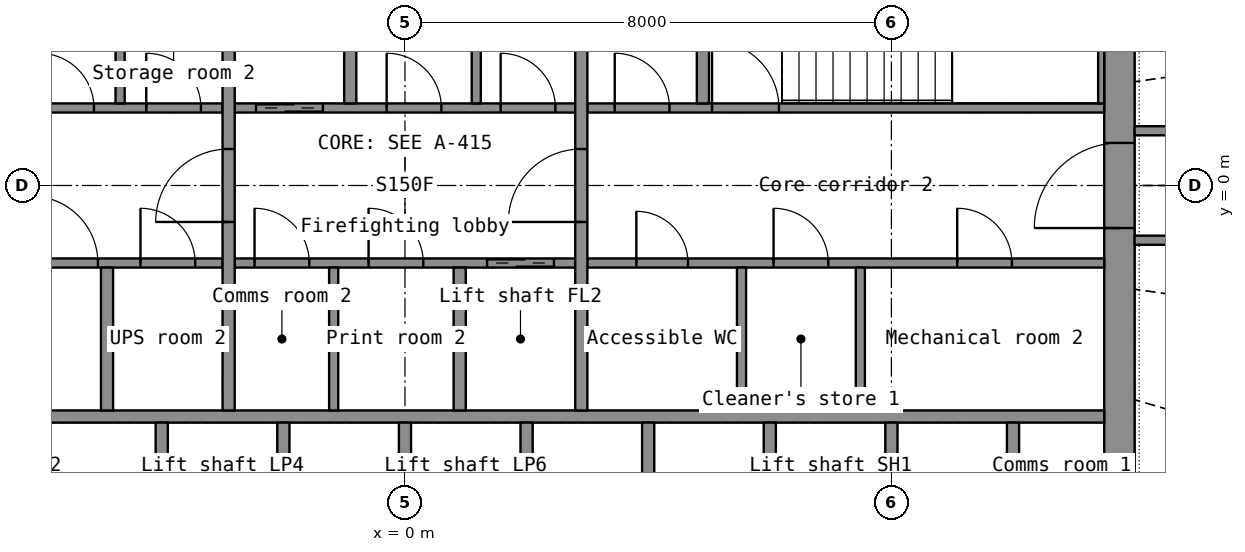
"""IFC4 building model, lengths in metres.
Left out: names, types, materials, properties, quantities, classifications, styles, units other than length and angle.
Written with IfcOpenShell. Run it as: python <this file> out.ifc"""

import sys

from ifc_helpers import new_model, si_unit, direction, frame, frame_2d, origin, place, context, subcontext, project, spatial, rectangle, extrude, element, fill, save


model = new_model("IFC4")
c1 = context("Model", 3, precision=1e-05, world=origin(), true_north=direction((0.0, 1.0)))
c2 = subcontext(c1, "Body", "Model", "MODEL_VIEW")
j1 = project(units=[si_unit("LENGTHUNIT", "METRE"), si_unit("PLANEANGLEUNIT", "RADIAN")], contexts=[c1])
p1 = place(None, origin())
s1 = spatial("IfcSite", under=j1, at=p1, CompositionType="ELEMENT")
p2 = place(p1, origin())
s2 = spatial("IfcBuilding", under=s1, at=p2, CompositionType="ELEMENT")
p3 = place(p2, frame((0.0, 0.0, 100.8)))
s3 = spatial("IfcBuildingStorey", under=s2, at=p3, CompositionType="ELEMENT", Elevation=100.8)
p4 = place(p3, frame((11.75, -7.2, 0.0), z_axis=(0.0, 0.0, 1.0), x_axis=(0.0, 1.0, 0.0)))
e1 = element("IfcWall", 1, at=p4, inside=s3, PredefinedType="SHEAR", context=c2, shape_type="SweptSolid", body=[
    extrude(rectangle(XDim=14.4, YDim=0.5, at=frame_2d((7.2, 0.0))), origin(), (0.0, 0.0, 1.0), 3.3),
])
p5 = place(p4, frame((6.5, 0.0, 0.0)))
e2 = element("IfcOpeningElement", 2, at=p5, cuts=e1, PredefinedType="OPENING", context=c2, shape_type="SweptSolid", body=[
    extrude(rectangle(XDim=1.4, YDim=2.2, at=frame_2d((0.7, 1.1))), frame((0.0, 0.26, 0.0), z_axis=(0.0, -1.0, 0.0), x_axis=(1.0, 0.0, 0.0)), (0.0, 0.0, 1.0), 0.52),
])
p6 = place(p3, frame((-11.5, -3.8, 0.0), z_axis=(0.0, 0.0, 1.0), x_axis=(1.0, 0.0, 0.0)))
e3 = element("IfcWall", 3, at=p6, inside=s3, PredefinedType="SHEAR", context=c2, shape_type="SweptSolid", body=[
    extrude(rectangle(XDim=23.0, YDim=0.2, at=frame_2d((11.5, 0.0))), origin(), (0.0, 0.0, 1.0), 3.3),
])
for number, where, z_axis, x_axis in (
    (4, (-4.0, -6.7, 0.0), (0.0, 0.0, 1.0), (0.0, 1.0, 0.0)),
    (5, (-2.0, -6.7, 0.0), (0.0, 0.0, 1.0), (0.0, 1.0, 0.0)),
    (6, (0.0, -6.7, 0.0), (0.0, 0.0, 1.0), (0.0, 1.0, 0.0)),
    (7, (2.0, -6.7, 0.0), (0.0, 0.0, 1.0), (0.0, 1.0, 0.0)),
    (8, (4.0, -6.7, 0.0), (0.0, 0.0, 1.0), (0.0, 1.0, 0.0)),
    (9, (6.0, -6.7, 0.0), (0.0, 0.0, 1.0), (0.0, 1.0, 0.0)),
    (10, (8.0, -6.7, 0.0), (0.0, 0.0, 1.0), (0.0, 1.0, 0.0)),
    (11, (10.0, -6.7, 0.0), (0.0, 0.0, 1.0), (0.0, 1.0, 0.0)),
):
    element("IfcWall", number, at=place(p3, frame(where, z_axis=z_axis, x_axis=x_axis)), inside=s3, PredefinedType="SHEAR", context=c2, shape_type="SweptSolid", body=[
        extrude(rectangle(XDim=2.8, YDim=0.2, at=frame_2d((1.4, 0.0))), origin(), (0.0, 0.0, 1.0), 3.3),
    ])
p7 = place(p3, frame((-11.5, -1.275, 0.0), z_axis=(0.0, 0.0, 1.0), x_axis=(1.0, 0.0, 0.0)))
e12 = element("IfcWall", 12, at=p7, inside=s3, PredefinedType="SHEAR", context=c2, shape_type="SweptSolid", body=[
    extrude(rectangle(XDim=8.5, YDim=0.15, at=frame_2d((4.25, 0.0))), origin(), (0.0, 0.0, 1.0), 3.3),
])
p8 = place(p7, frame((5.35, 0.0, 0.0)))
e13 = element("IfcOpeningElement", 13, at=p8, cuts=e12, PredefinedType="OPENING", context=c2, shape_type="SweptSolid", body=[
    extrude(rectangle(XDim=1.1, YDim=2.15, at=frame_2d((0.55, 1.075))), frame((0.0, 0.085, 0.0), z_axis=(0.0, -1.0, 0.0), x_axis=(1.0, 0.0, 0.0)), (0.0, 0.0, 1.0), 0.17),
])
p9 = place(p7, frame((7.15, 0.0, 0.0)))
e14 = element("IfcOpeningElement", 14, at=p9, cuts=e12, PredefinedType="OPENING", context=c2, shape_type="SweptSolid", body=[
    extrude(rectangle(XDim=0.9, YDim=2.1, at=frame_2d((0.45, 1.05))), frame((0.0, 0.085, 0.0), z_axis=(0.0, -1.0, 0.0), x_axis=(1.0, 0.0, 0.0)), (0.0, 0.0, 1.0), 0.17),
])
p10 = place(p3, frame((-2.8, -1.275, 0.0), z_axis=(0.0, 0.0, 1.0), x_axis=(1.0, 0.0, 0.0)))
e15 = element("IfcWall", 15, at=p10, inside=s3, PredefinedType="SHEAR", context=c2, shape_type="SweptSolid", body=[
    extrude(rectangle(XDim=5.6, YDim=0.15, at=frame_2d((2.8, 0.0))), origin(), (0.0, 0.0, 1.0), 3.3),
])
p11 = place(p10, frame((4.15, 0.0, 0.0)))
e16 = element("IfcOpeningElement", 16, at=p11, cuts=e15, PredefinedType="OPENING", context=c2, shape_type="SweptSolid", body=[
    extrude(rectangle(XDim=1.1, YDim=2.2, at=frame_2d((0.55, 1.1))), frame((0.0, 0.085, 0.0), z_axis=(0.0, -1.0, 0.0), x_axis=(1.0, 0.0, 0.0)), (0.0, 0.0, 1.0), 0.17),
])
p12 = place(p10, frame((0.326, 0.0, 0.0)))
e17 = element("IfcOpeningElement", 17, at=p12, cuts=e15, PredefinedType="OPENING", context=c2, shape_type="SweptSolid", body=[
    extrude(rectangle(XDim=0.9, YDim=2.1, at=frame_2d((0.45, 1.05))), frame((0.0, 0.085, 0.0), z_axis=(0.0, -1.0, 0.0), x_axis=(1.0, 0.0, 0.0)), (0.0, 0.0, 1.0), 0.17),
])
p13 = place(p10, frame((2.201, 0.0, 0.0)))
e18 = element("IfcOpeningElement", 18, at=p13, cuts=e15, PredefinedType="OPENING", context=c2, shape_type="SweptSolid", body=[
    extrude(rectangle(XDim=0.9, YDim=2.1, at=frame_2d((0.45, 1.05))), frame((0.0, 0.085, 0.0), z_axis=(0.0, -1.0, 0.0), x_axis=(1.0, 0.0, 0.0)), (0.0, 0.0, 1.0), 0.17),
])
p14 = place(p3, frame((3.0, -1.275, 0.0), z_axis=(0.0, 0.0, 1.0), x_axis=(1.0, 0.0, 0.0)))
e19 = element("IfcWall", 19, at=p14, inside=s3, PredefinedType="PARTITIONING", context=c2, shape_type="SweptSolid", body=[
    extrude(rectangle(XDim=8.5, YDim=0.15, at=frame_2d((4.25, 0.0))), origin(), (0.0, 0.0, 1.0), 3.3),
])
p15 = place(p14, frame((0.805, 0.0, 0.0)))
e20 = element("IfcOpeningElement", 20, at=p15, cuts=e19, PredefinedType="OPENING", context=c2, shape_type="SweptSolid", body=[
    extrude(rectangle(XDim=0.85, YDim=2.1, at=frame_2d((0.425, 1.05))), frame((0.0, 0.085, 0.0), z_axis=(0.0, -1.0, 0.0), x_axis=(1.0, 0.0, 0.0)), (0.0, 0.0, 1.0), 0.17),
])
p16 = place(p14, frame((3.062, 0.0, 0.0)))
e21 = element("IfcOpeningElement", 21, at=p16, cuts=e19, PredefinedType="OPENING", context=c2, shape_type="SweptSolid", body=[
    extrude(rectangle(XDim=0.9, YDim=2.1, at=frame_2d((0.45, 1.05))), frame((0.0, 0.085, 0.0), z_axis=(0.0, -1.0, 0.0), x_axis=(1.0, 0.0, 0.0)), (0.0, 0.0, 1.0), 0.17),
])
p17 = place(p14, frame((6.082, 0.0, 0.0)))
e22 = element("IfcOpeningElement", 22, at=p17, cuts=e19, PredefinedType="OPENING", context=c2, shape_type="SweptSolid", body=[
    extrude(rectangle(XDim=0.9, YDim=2.1, at=frame_2d((0.45, 1.05))), frame((0.0, 0.085, 0.0), z_axis=(0.0, -1.0, 0.0), x_axis=(1.0, 0.0, 0.0)), (0.0, 0.0, 1.0), 0.17),
])
p18 = place(p3, frame((-11.5, 1.275, 0.0), z_axis=(0.0, 0.0, 1.0), x_axis=(1.0, 0.0, 0.0)))
e23 = element("IfcWall", 23, at=p18, inside=s3, PredefinedType="PARTITIONING", context=c2, shape_type="SweptSolid", body=[
    extrude(rectangle(XDim=8.5, YDim=0.15, at=frame_2d((4.25, 0.0))), origin(), (0.0, 0.0, 1.0), 3.3),
])
p19 = place(p18, frame((0.782, 0.0, 0.0)))
e24 = element("IfcOpeningElement", 24, at=p19, cuts=e23, PredefinedType="OPENING", context=c2, shape_type="SweptSolid", body=[
    extrude(rectangle(XDim=0.85, YDim=2.1, at=frame_2d((0.425, 1.05))), frame((0.0, 0.085, 0.0), z_axis=(0.0, -1.0, 0.0), x_axis=(1.0, 0.0, 0.0)), (0.0, 0.0, 1.0), 0.17),
])
p20 = place(p18, frame((3.347, 0.0, 0.0)))
e25 = element("IfcOpeningElement", 25, at=p20, cuts=e23, PredefinedType="OPENING", context=c2, shape_type="SweptSolid", body=[
    extrude(rectangle(XDim=0.85, YDim=2.1, at=frame_2d((0.425, 1.05))), frame((0.0, 0.085, 0.0), z_axis=(0.0, -1.0, 0.0), x_axis=(1.0, 0.0, 0.0)), (0.0, 0.0, 1.0), 0.17),
])
p21 = place(p18, frame((5.485, 0.0, 0.0)))
e26 = element("IfcOpeningElement", 26, at=p21, cuts=e23, PredefinedType="OPENING", context=c2, shape_type="SweptSolid", body=[
    extrude(rectangle(XDim=0.9, YDim=2.1, at=frame_2d((0.45, 1.05))), frame((0.0, 0.085, 0.0), z_axis=(0.0, -1.0, 0.0), x_axis=(1.0, 0.0, 0.0)), (0.0, 0.0, 1.0), 0.17),
])
p22 = place(p18, frame((7.245, 0.0, 0.0)))
e27 = element("IfcOpeningElement", 27, at=p22, cuts=e23, PredefinedType="OPENING", context=c2, shape_type="SweptSolid", body=[
    extrude(rectangle(XDim=0.9, YDim=2.1, at=frame_2d((0.45, 1.05))), frame((0.0, 0.085, 0.0), z_axis=(0.0, -1.0, 0.0), x_axis=(1.0, 0.0, 0.0)), (0.0, 0.0, 1.0), 0.17),
])
p23 = place(p3, frame((-2.8, 1.275, 0.0), z_axis=(0.0, 0.0, 1.0), x_axis=(1.0, 0.0, 0.0)))
e28 = element("IfcWall", 28, at=p23, inside=s3, PredefinedType="SHEAR", context=c2, shape_type="SweptSolid", body=[
    extrude(rectangle(XDim=5.6, YDim=0.15, at=frame_2d((2.8, 0.0))), origin(), (0.0, 0.0, 1.0), 3.3),
])
p24 = place(p23, frame((0.35, 0.0, 0.0)))
e29 = element("IfcOpeningElement", 29, at=p24, cuts=e28, PredefinedType="OPENING", context=c2, shape_type="SweptSolid", body=[
    extrude(rectangle(XDim=1.1, YDim=2.2, at=frame_2d((0.55, 1.1))), frame((0.0, 0.085, 0.0), z_axis=(0.0, -1.0, 0.0), x_axis=(1.0, 0.0, 0.0)), (0.0, 0.0, 1.0), 0.17),
])
p25 = place(p23, frame((2.499, 0.0, 0.0)))
e30 = element("IfcOpeningElement", 30, at=p25, cuts=e28, PredefinedType="OPENING", context=c2, shape_type="SweptSolid", body=[
    extrude(rectangle(XDim=0.9, YDim=2.1, at=frame_2d((0.45, 1.05))), frame((0.0, 0.085, 0.0), z_axis=(0.0, -1.0, 0.0), x_axis=(1.0, 0.0, 0.0)), (0.0, 0.0, 1.0), 0.17),
])
p26 = place(p23, frame((4.374, 0.0, 0.0)))
e31 = element("IfcOpeningElement", 31, at=p26, cuts=e28, PredefinedType="OPENING", context=c2, shape_type="SweptSolid", body=[
    extrude(rectangle(XDim=0.9, YDim=2.1, at=frame_2d((0.45, 1.05))), frame((0.0, 0.085, 0.0), z_axis=(0.0, -1.0, 0.0), x_axis=(1.0, 0.0, 0.0)), (0.0, 0.0, 1.0), 0.17),
])
p27 = place(p3, frame((3.0, 1.275, 0.0), z_axis=(0.0, 0.0, 1.0), x_axis=(1.0, 0.0, 0.0)))
e32 = element("IfcWall", 32, at=p27, inside=s3, PredefinedType="SHEAR", context=c2, shape_type="SweptSolid", body=[
    extrude(rectangle(XDim=8.5, YDim=0.15, at=frame_2d((4.25, 0.0))), origin(), (0.0, 0.0, 1.0), 3.3),
])
p28 = place(p27, frame((2.05, 0.0, 0.0)))
e33 = element("IfcOpeningElement", 33, at=p28, cuts=e32, PredefinedType="OPENING", context=c2, shape_type="SweptSolid", body=[
    extrude(rectangle(XDim=1.1, YDim=2.15, at=frame_2d((0.55, 1.075))), frame((0.0, 0.085, 0.0), z_axis=(0.0, -1.0, 0.0), x_axis=(1.0, 0.0, 0.0)), (0.0, 0.0, 1.0), 0.17),
])
p29 = place(p27, frame((0.45, 0.0, 0.0)))
e34 = element("IfcOpeningElement", 34, at=p29, cuts=e32, PredefinedType="OPENING", context=c2, shape_type="SweptSolid", body=[
    extrude(rectangle(XDim=0.9, YDim=2.1, at=frame_2d((0.45, 1.05))), frame((0.0, 0.085, 0.0), z_axis=(0.0, -1.0, 0.0), x_axis=(1.0, 0.0, 0.0)), (0.0, 0.0, 1.0), 0.17),
])
p30 = place(p3, frame((-2.9, -3.7, 0.0), z_axis=(0.0, 0.0, 1.0), x_axis=(0.0, 1.0, 0.0)))
e35 = element("IfcWall", 35, at=p30, inside=s3, PredefinedType="SHEAR", context=c2, shape_type="SweptSolid", body=[
    extrude(rectangle(XDim=7.4, YDim=0.2, at=frame_2d((3.7, 0.0))), origin(), (0.0, 0.0, 1.0), 3.3),
])
p31 = place(p30, frame((3.1, 0.0, 0.0)))
e36 = element("IfcOpeningElement", 36, at=p31, cuts=e35, PredefinedType="OPENING", context=c2, shape_type="SweptSolid", body=[
    extrude(rectangle(XDim=1.2, YDim=2.2, at=frame_2d((0.6, 1.1))), frame((0.0, 0.11, 0.0), z_axis=(0.0, -1.0, 0.0), x_axis=(1.0, 0.0, 0.0)), (0.0, 0.0, 1.0), 0.22),
])
p32 = place(p3, frame((2.9, -3.7, 0.0), z_axis=(0.0, 0.0, 1.0), x_axis=(0.0, 1.0, 0.0)))
e37 = element("IfcWall", 37, at=p32, inside=s3, PredefinedType="SHEAR", context=c2, shape_type="SweptSolid", body=[
    extrude(rectangle(XDim=7.4, YDim=0.2, at=frame_2d((3.7, 0.0))), origin(), (0.0, 0.0, 1.0), 3.3),
])
p33 = place(p32, frame((3.1, 0.0, 0.0)))
e38 = element("IfcOpeningElement", 38, at=p33, cuts=e37, PredefinedType="OPENING", context=c2, shape_type="SweptSolid", body=[
    extrude(rectangle(XDim=1.2, YDim=2.2, at=frame_2d((0.6, 1.1))), frame((0.0, 0.11, 0.0), z_axis=(0.0, -1.0, 0.0), x_axis=(1.0, 0.0, 0.0)), (0.0, 0.0, 1.0), 0.22),
])
for number, where, z_axis, x_axis in (
    (39, (-0.9, 1.35, 0.0), (0.0, 0.0, 1.0), (0.0, 1.0, 0.0)),
    (40, (0.9, -3.7, 0.0), (0.0, 0.0, 1.0), (0.0, 1.0, 0.0)),
):
    element("IfcWall", number, at=place(p3, frame(where, z_axis=z_axis, x_axis=x_axis)), inside=s3, PredefinedType="SHEAR", context=c2, shape_type="SweptSolid", body=[
        extrude(rectangle(XDim=2.35, YDim=0.2, at=frame_2d((1.175, 0.0))), origin(), (0.0, 0.0, 1.0), 3.3),
    ])
p34 = place(p3, frame((11.45, 1.35, 0.0), z_axis=(0.0, 0.0, 1.0), x_axis=(0.0, 1.0, 0.0)))
e41 = element("IfcWall", 41, at=p34, inside=s3, PredefinedType="SHEAR", context=c2, shape_type="SweptSolid", body=[
    extrude(rectangle(XDim=2.35, YDim=0.1, at=frame_2d((1.175, 0.0))), origin(), (0.0, 0.0, 1.0), 3.3),
])
for number, where, z_axis, x_axis in (
    (42, (-4.9, -3.7, 0.0), (0.0, 0.0, 1.0), (0.0, 1.0, 0.0)),
    (43, (4.9, 1.35, 0.0), (0.0, 0.0, 1.0), (0.0, 1.0, 0.0)),
):
    element("IfcWall", number, at=place(p3, frame(where, z_axis=z_axis, x_axis=x_axis)), inside=s3, PredefinedType="SHEAR", context=c2, shape_type="SweptSolid", body=[
        extrude(rectangle(XDim=2.35, YDim=0.2, at=frame_2d((1.175, 0.0))), origin(), (0.0, 0.0, 1.0), 3.3),
    ])
for number, where, z_axis, x_axis in (
    (44, (-4.685, 1.35, 0.0), (0.0, 0.0, 1.0), (0.0, 1.0, 0.0)),
    (45, (5.535, -3.7, 0.0), (0.0, 0.0, 1.0), (0.0, 1.0, 0.0)),
    (46, (7.489, -3.7, 0.0), (0.0, 0.0, 1.0), (0.0, 1.0, 0.0)),
    (47, (1.173, 1.35, 0.0), (0.0, 0.0, 1.0), (0.0, 1.0, 0.0)),
    (48, (-1.173, -3.7, 0.0), (0.0, 0.0, 1.0), (0.0, 1.0, 0.0)),
):
    element("IfcWall", number, at=place(p3, frame(where, z_axis=z_axis, x_axis=x_axis)), inside=s3, PredefinedType="PARTITIONING", context=c2, shape_type="SweptSolid", body=[
        extrude(rectangle(XDim=2.35, YDim=0.15, at=frame_2d((1.175, 0.0))), origin(), (0.0, 0.0, 1.0), 3.3),
    ])
p35 = place(p3, frame((16.0, 0.9, 0.0), z_axis=(0.0, 0.0, 1.0), x_axis=(-1.0, 0.0, 0.0)))
e49 = element("IfcWall", 49, at=p35, inside=s3, PredefinedType="PARTITIONING", context=c2, shape_type="SweptSolid", body=[
    extrude(rectangle(XDim=4.0, YDim=0.15, at=frame_2d((2.0, 0.0))), origin(), (0.0, 0.0, 1.0), 2.4),
])
p36 = place(p35, frame((1.5, 0.0, 0.0)))
e50 = element("IfcOpeningElement", 50, at=p36, cuts=e49, PredefinedType="OPENING", context=c2, shape_type="SweptSolid", body=[
    extrude(rectangle(XDim=1.0, YDim=2.2, at=frame_2d((0.5, 1.1))), frame((0.0, 0.085, 0.0), z_axis=(0.0, -1.0, 0.0), x_axis=(1.0, 0.0, 0.0)), (0.0, 0.0, 1.0), 0.17),
])
p37 = place(p3, frame((12.0, -0.9, 0.0), z_axis=(0.0, 0.0, 1.0), x_axis=(1.0, 0.0, 0.0)))
e51 = element("IfcWall", 51, at=p37, inside=s3, PredefinedType="PARTITIONING", context=c2, shape_type="SweptSolid", body=[
    extrude(rectangle(XDim=0.559, YDim=0.15, at=frame_2d((0.279, 0.0))), origin(), (0.0, 0.0, 1.0), 2.4),
])
p38 = place(p5, origin())
e52 = element("IfcDoor", 52, at=p38, inside=s3, OperationType="DOUBLE_DOOR_SINGLE_SWING", PredefinedType="DOOR", context=c2, shape_type="SweptSolid", body=[
    extrude(rectangle(XDim=1.4, YDim=2.2, at=frame_2d((0.7, 1.1))), frame((0.0, 0.025, 0.0), z_axis=(0.0, -1.0, 0.0), x_axis=(1.0, 0.0, 0.0)), (0.0, 0.0, 1.0), 0.05),
])
fill(e2, e52)
p39 = place(p31, origin())
e53 = element("IfcDoor", 53, at=p39, inside=s3, OperationType="SINGLE_SWING_LEFT", PredefinedType="DOOR", context=c2, shape_type="SweptSolid", body=[
    extrude(rectangle(XDim=1.2, YDim=2.2, at=frame_2d((0.6, 1.1))), frame((0.0, 0.025, 0.0), z_axis=(0.0, -1.0, 0.0), x_axis=(1.0, 0.0, 0.0)), (0.0, 0.0, 1.0), 0.05),
])
fill(e36, e53)
p40 = place(p33, origin())
e54 = element("IfcDoor", 54, at=p40, inside=s3, OperationType="SINGLE_SWING_LEFT", PredefinedType="DOOR", context=c2, shape_type="SweptSolid", body=[
    extrude(rectangle(XDim=1.2, YDim=2.2, at=frame_2d((0.6, 1.1))), frame((0.0, 0.025, 0.0), z_axis=(0.0, -1.0, 0.0), x_axis=(1.0, 0.0, 0.0)), (0.0, 0.0, 1.0), 0.05),
])
fill(e38, e54)
p41 = place(p24, origin())
e55 = element("IfcDoor", 55, at=p41, inside=s3, OperationType="DOUBLE_DOOR_SLIDING", PredefinedType="DOOR", context=c2, shape_type="SweptSolid", body=[
    extrude(rectangle(XDim=1.1, YDim=2.2, at=frame_2d((0.55, 1.1))), frame((0.0, 0.025, 0.0), z_axis=(0.0, -1.0, 0.0), x_axis=(1.0, 0.0, 0.0)), (0.0, 0.0, 1.0), 0.05),
])
fill(e29, e55)
p42 = place(p11, origin())
e56 = element("IfcDoor", 56, at=p42, inside=s3, OperationType="DOUBLE_DOOR_SLIDING", PredefinedType="DOOR", context=c2, shape_type="SweptSolid", body=[
    extrude(rectangle(XDim=1.1, YDim=2.2, at=frame_2d((0.55, 1.1))), frame((0.0, 0.025, 0.0), z_axis=(0.0, -1.0, 0.0), x_axis=(1.0, 0.0, 0.0)), (0.0, 0.0, 1.0), 0.05),
])
fill(e16, e56)
p43 = place(p8, origin())
e57 = element("IfcDoor", 57, at=p43, inside=s3, OperationType="SINGLE_SWING_LEFT", PredefinedType="DOOR", context=c2, shape_type="SweptSolid", body=[
    extrude(rectangle(XDim=1.1, YDim=2.15, at=frame_2d((0.55, 1.075))), frame((0.0, 0.025, 0.0), z_axis=(0.0, -1.0, 0.0), x_axis=(1.0, 0.0, 0.0)), (0.0, 0.0, 1.0), 0.05),
])
fill(e13, e57)
p44 = place(p28, origin())
e58 = element("IfcDoor", 58, at=p44, inside=s3, OperationType="SINGLE_SWING_LEFT", PredefinedType="DOOR", context=c2, shape_type="SweptSolid", body=[
    extrude(rectangle(XDim=1.1, YDim=2.15, at=frame_2d((0.55, 1.075))), frame((0.0, 0.025, 0.0), z_axis=(0.0, -1.0, 0.0), x_axis=(1.0, 0.0, 0.0)), (0.0, 0.0, 1.0), 0.05),
])
fill(e33, e58)
p45 = place(p21, origin())
e59 = element("IfcDoor", 59, at=p45, inside=s3, OperationType="SINGLE_SWING_LEFT", PredefinedType="DOOR", context=c2, shape_type="SweptSolid", body=[
    extrude(rectangle(XDim=0.9, YDim=2.1, at=frame_2d((0.45, 1.05))), frame((0.0, 0.025, 0.0), z_axis=(0.0, -1.0, 0.0), x_axis=(1.0, 0.0, 0.0)), (0.0, 0.0, 1.0), 0.05),
])
fill(e26, e59)
p46 = place(p22, origin())
e60 = element("IfcDoor", 60, at=p46, inside=s3, OperationType="SINGLE_SWING_LEFT", PredefinedType="DOOR", context=c2, shape_type="SweptSolid", body=[
    extrude(rectangle(XDim=0.9, YDim=2.1, at=frame_2d((0.45, 1.05))), frame((0.0, 0.025, 0.0), z_axis=(0.0, -1.0, 0.0), x_axis=(1.0, 0.0, 0.0)), (0.0, 0.0, 1.0), 0.05),
])
fill(e27, e60)
p47 = place(p15, origin())
e61 = element("IfcDoor", 61, at=p47, inside=s3, OperationType="SINGLE_SWING_LEFT", PredefinedType="DOOR", context=c2, shape_type="SweptSolid", body=[
    extrude(rectangle(XDim=0.85, YDim=2.1, at=frame_2d((0.425, 1.05))), frame((0.0, 0.025, 0.0), z_axis=(0.0, -1.0, 0.0), x_axis=(1.0, 0.0, 0.0)), (0.0, 0.0, 1.0), 0.05),
])
fill(e20, e61)
p48 = place(p16, origin())
e62 = element("IfcDoor", 62, at=p48, inside=s3, OperationType="SINGLE_SWING_LEFT", PredefinedType="DOOR", context=c2, shape_type="SweptSolid", body=[
    extrude(rectangle(XDim=0.9, YDim=2.1, at=frame_2d((0.45, 1.05))), frame((0.0, 0.025, 0.0), z_axis=(0.0, -1.0, 0.0), x_axis=(1.0, 0.0, 0.0)), (0.0, 0.0, 1.0), 0.05),
])
fill(e21, e62)
p49 = place(p17, origin())
e63 = element("IfcDoor", 63, at=p49, inside=s3, OperationType="SINGLE_SWING_LEFT", PredefinedType="DOOR", context=c2, shape_type="SweptSolid", body=[
    extrude(rectangle(XDim=0.9, YDim=2.1, at=frame_2d((0.45, 1.05))), frame((0.0, 0.025, 0.0), z_axis=(0.0, -1.0, 0.0), x_axis=(1.0, 0.0, 0.0)), (0.0, 0.0, 1.0), 0.05),
])
fill(e22, e63)
p50 = place(p25, origin())
e64 = element("IfcDoor", 64, at=p50, inside=s3, OperationType="SINGLE_SWING_LEFT", PredefinedType="DOOR", context=c2, shape_type="SweptSolid", body=[
    extrude(rectangle(XDim=0.9, YDim=2.1, at=frame_2d((0.45, 1.05))), frame((0.0, 0.025, 0.0), z_axis=(0.0, -1.0, 0.0), x_axis=(1.0, 0.0, 0.0)), (0.0, 0.0, 1.0), 0.05),
])
fill(e30, e64)
p51 = place(p26, origin())
e65 = element("IfcDoor", 65, at=p51, inside=s3, OperationType="SINGLE_SWING_LEFT", PredefinedType="DOOR", context=c2, shape_type="SweptSolid", body=[
    extrude(rectangle(XDim=0.9, YDim=2.1, at=frame_2d((0.45, 1.05))), frame((0.0, 0.025, 0.0), z_axis=(0.0, -1.0, 0.0), x_axis=(1.0, 0.0, 0.0)), (0.0, 0.0, 1.0), 0.05),
])
fill(e31, e65)
p52 = place(p12, origin())
e66 = element("IfcDoor", 66, at=p52, inside=s3, OperationType="SINGLE_SWING_LEFT", PredefinedType="DOOR", context=c2, shape_type="SweptSolid", body=[
    extrude(rectangle(XDim=0.9, YDim=2.1, at=frame_2d((0.45, 1.05))), frame((0.0, 0.025, 0.0), z_axis=(0.0, -1.0, 0.0), x_axis=(1.0, 0.0, 0.0)), (0.0, 0.0, 1.0), 0.05),
])
fill(e17, e66)
p53 = place(p13, origin())
e67 = element("IfcDoor", 67, at=p53, inside=s3, OperationType="SINGLE_SWING_LEFT", PredefinedType="DOOR", context=c2, shape_type="SweptSolid", body=[
    extrude(rectangle(XDim=0.9, YDim=2.1, at=frame_2d((0.45, 1.05))), frame((0.0, 0.025, 0.0), z_axis=(0.0, -1.0, 0.0), x_axis=(1.0, 0.0, 0.0)), (0.0, 0.0, 1.0), 0.05),
])
fill(e18, e67)
p54 = place(p29, origin())
e68 = element("IfcDoor", 68, at=p54, inside=s3, OperationType="SINGLE_SWING_LEFT", PredefinedType="DOOR", context=c2, shape_type="SweptSolid", body=[
    extrude(rectangle(XDim=0.9, YDim=2.1, at=frame_2d((0.45, 1.05))), frame((0.0, 0.025, 0.0), z_axis=(0.0, -1.0, 0.0), x_axis=(1.0, 0.0, 0.0)), (0.0, 0.0, 1.0), 0.05),
])
fill(e34, e68)
p55 = place(p9, origin())
e69 = element("IfcDoor", 69, at=p55, inside=s3, OperationType="SINGLE_SWING_LEFT", PredefinedType="DOOR", context=c2, shape_type="SweptSolid", body=[
    extrude(rectangle(XDim=0.9, YDim=2.1, at=frame_2d((0.45, 1.05))), frame((0.0, 0.025, 0.0), z_axis=(0.0, -1.0, 0.0), x_axis=(1.0, 0.0, 0.0)), (0.0, 0.0, 1.0), 0.05),
])
fill(e14, e69)
save(model, sys.argv[1])
